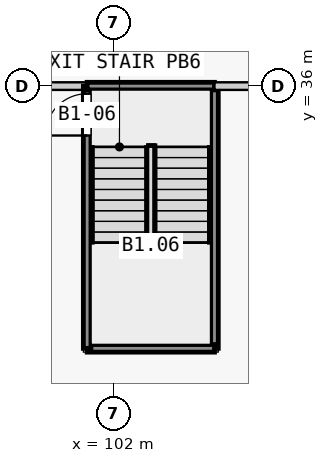
"""IFC4 building model, lengths in metres.
Left out: names, types, materials, properties, quantities, classifications, styles, units other than length and angle.
Written with IfcOpenShell. Run it as: python <this file> out.ifc"""

import sys

from ifc_helpers import new_model, si_unit, direction, frame, frame_2d, origin, place, context, subcontext, project, spatial, rectangle, extrude, element, fill, save


model = new_model("IFC4")
c1 = context("Model", 3, precision=1e-05, world=origin(), true_north=direction((0.0, 1.0)))
c2 = subcontext(c1, "Body", "Model", "MODEL_VIEW")
j1 = project(units=[si_unit("LENGTHUNIT", "METRE"), si_unit("PLANEANGLEUNIT", "RADIAN")], contexts=[c1])
p1 = place(None, origin())
s1 = spatial("IfcSite", under=j1, at=p1, CompositionType="ELEMENT")
p2 = place(p1, origin())
s2 = spatial("IfcBuilding", under=s1, at=p2, CompositionType="ELEMENT")
p3 = place(p2, frame((0.0, 0.0, -7.0)))
s3 = spatial("IfcBuildingStorey", under=s2, at=p3, CompositionType="ELEMENT", Elevation=-7.0)
p4 = place(p3, frame((101.3, 36.0, 0.0), z_axis=(0.0, 0.0, 1.0), x_axis=(-1.0, 0.0, 0.0)))
e1 = element("IfcWall", 1, at=p4, inside=s3, PredefinedType="PARTITIONING", context=c2, shape_type="SweptSolid", body=[
    extrude(rectangle(XDim=1.7, YDim=0.2, at=frame_2d((0.85, 0.0))), origin(), (0.0, 0.0, 1.0), 6.55),
])
p5 = place(p3, frame((104.65, 36.0, 0.0), z_axis=(0.0, 0.0, 1.0), x_axis=(0.0, -1.0, 0.0)))
e2 = element("IfcWall", 2, at=p5, inside=s3, PredefinedType="PARTITIONING", context=c2, shape_type="SweptSolid", body=[
    extrude(rectangle(XDim=6.9, YDim=0.2, at=frame_2d((3.45, 0.0))), origin(), (0.0, 0.0, 1.0), 6.55),
])
p6 = place(p3, frame((104.65, 29.1, 0.0), z_axis=(0.0, 0.0, 1.0), x_axis=(-1.0, 0.0, 0.0)))
e3 = element("IfcWall", 3, at=p6, inside=s3, PredefinedType="PARTITIONING", context=c2, shape_type="SweptSolid", body=[
    extrude(rectangle(XDim=3.35, YDim=0.2, at=frame_2d((1.675, 0.0))), origin(), (0.0, 0.0, 1.0), 6.55),
])
p7 = place(p3, frame((101.3, 29.1, 0.0), z_axis=(0.0, 0.0, 1.0), x_axis=(0.0, 1.0, 0.0)))
e4 = element("IfcWall", 4, at=p7, inside=s3, PredefinedType="PARTITIONING", context=c2, shape_type="SweptSolid", body=[
    extrude(rectangle(XDim=6.9, YDim=0.2, at=frame_2d((3.45, 0.0))), origin(), (0.0, 0.0, 1.0), 6.55),
])
p8 = place(p7, frame((5.6, 0.0, 0.0)))
e5 = element("IfcOpeningElement", 5, at=p8, cuts=e4, PredefinedType="OPENING", context=c2, shape_type="SweptSolid", body=[
    extrude(rectangle(XDim=1.1, YDim=2.1, at=frame_2d((0.55, 1.05))), frame((0.0, 0.11, 0.0), z_axis=(0.0, -1.0, 0.0), x_axis=(1.0, 0.0, 0.0)), (0.0, 0.0, 1.0), 0.22),
])
p9 = place(p3, frame((101.3, 36.0, 0.0), z_axis=(0.0, 0.0, 1.0), x_axis=(1.0, 0.0, 0.0)))
e6 = element("IfcWall", 6, at=p9, inside=s3, PredefinedType="PARTITIONING", context=c2, shape_type="SweptSolid", body=[
    extrude(rectangle(XDim=3.35, YDim=0.2, at=frame_2d((1.675, 0.0))), origin(), (0.0, 0.0, 1.0), 6.55),
])
p10 = place(p3, frame((105.9, 36.0, 0.0), z_axis=(0.0, 0.0, 1.0), x_axis=(-1.0, 0.0, 0.0)))
e7 = element("IfcWall", 7, at=p10, inside=s3, PredefinedType="PARTITIONING", context=c2, shape_type="SweptSolid", body=[
    extrude(rectangle(XDim=1.25, YDim=0.2, at=frame_2d((0.625, 0.0))), origin(), (0.0, 0.0, 1.0), 6.55),
])
p11 = place(p8, origin())
e8 = element("IfcDoor", 8, at=p11, inside=s3, OperationType="SINGLE_SWING_RIGHT", PredefinedType="DOOR", context=c2, shape_type="SweptSolid", body=[
    extrude(rectangle(XDim=1.1, YDim=2.1, at=frame_2d((0.55, 1.05))), frame((0.0, 0.025, 0.0), z_axis=(0.0, -1.0, 0.0), x_axis=(1.0, 0.0, 0.0)), (0.0, 0.0, 1.0), 0.05),
])
fill(e5, e8)
save(model, sys.argv[1])
